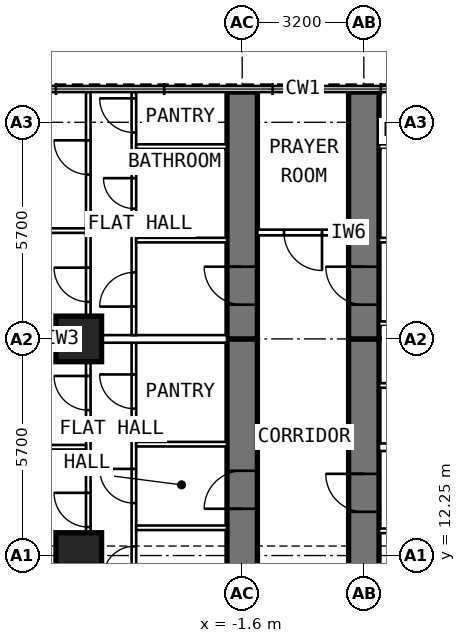
"""IFC4 building model, lengths in metres.
Left out: names, types, materials, properties, quantities, classifications, styles, units other than length and angle.
Written with IfcOpenShell. Run it as: python <this file> out.ifc"""

import sys

from ifc_helpers import new_model, si_unit, direction, frame, frame_2d, origin, origin_2d, place, context, subcontext, project, spatial, rectangle, extrude, element, fill, save


model = new_model("IFC4")
c1 = context("Model", 3, precision=1e-05, world=origin(), true_north=direction((0.0, 1.0)))
c2 = subcontext(c1, "Body", "Model", "MODEL_VIEW")
j1 = project(units=[si_unit("LENGTHUNIT", "METRE"), si_unit("PLANEANGLEUNIT", "RADIAN")], contexts=[c1])
p1 = place(None, origin())
s1 = spatial("IfcSite", under=j1, at=p1, CompositionType="ELEMENT")
p2 = place(p1, origin())
s2 = spatial("IfcBuilding", under=s1, at=p2, CompositionType="ELEMENT")
p3 = place(p2, frame((0.0, 0.0, 141.8)))
s3 = spatial("IfcBuildingStorey", under=s2, at=p3, CompositionType="ELEMENT", Elevation=141.8)
for number, where, z_axis, x_axis in (
    (1, (-5.9, 12.25, 0.0), (0.0, 0.0, 1.0), (0.0, 1.0, 0.0)),
    (2, (-5.9, 17.95, 0.0), (0.0, 0.0, 1.0), (0.0, 1.0, 0.0)),
):
    element("IfcColumn", number, at=place(p3, frame(where, z_axis=z_axis, x_axis=x_axis)), inside=s3, PredefinedType="COLUMN", context=c2, shape_type="SweptSolid", body=[
        extrude(rectangle(XDim=1.2, YDim=1.2, at=origin_2d()), origin(), (0.0, 0.0, 1.0), 3.6),
    ])
p4 = place(p3, frame((-1.6, 9.6, 0.0), z_axis=(0.0, 0.0, 1.0), x_axis=(0.0, 1.0, 0.0)))
e3 = element("IfcWall", 3, at=p4, inside=s3, PredefinedType="SHEAR", context=c2, shape_type="SweptSolid", body=[
    extrude(rectangle(XDim=8.35, YDim=0.8, at=frame_2d((4.175, 0.0))), origin(), (0.0, 0.0, 1.0), 3.6),
])
p5 = place(p4, frame((3.88, 0.0, 0.0)))
e4 = element("IfcOpeningElement", 4, at=p5, cuts=e3, PredefinedType="OPENING", context=c2, shape_type="SweptSolid", body=[
    extrude(rectangle(XDim=1.0, YDim=2.1, at=frame_2d((0.5, 1.05))), frame((0.0, 0.412, 0.0), z_axis=(0.0, -1.0, 0.0), x_axis=(1.0, 0.0, 0.0)), (0.0, 0.0, 1.0), 0.824),
])
p6 = place(p3, frame((-1.6, 17.95, 0.0), z_axis=(0.0, 0.0, 1.0), x_axis=(0.0, 1.0, 0.0)))
e5 = element("IfcWall", 5, at=p6, inside=s3, PredefinedType="SHEAR", context=c2, shape_type="SweptSolid", body=[
    extrude(rectangle(XDim=6.495, YDim=0.8, at=frame_2d((3.248, 0.0))), origin(), (0.0, 0.0, 1.0), 3.6),
])
p7 = place(p6, frame((0.9, 0.0, 0.0)))
e6 = element("IfcOpeningElement", 6, at=p7, cuts=e5, PredefinedType="OPENING", context=c2, shape_type="SweptSolid", body=[
    extrude(rectangle(XDim=1.0, YDim=2.1, at=frame_2d((0.5, 1.05))), frame((0.0, 0.412, 0.0), z_axis=(0.0, -1.0, 0.0), x_axis=(1.0, 0.0, 0.0)), (0.0, 0.0, 1.0), 0.824),
])
p8 = place(p3, frame((1.6, 9.6, 0.0), z_axis=(0.0, 0.0, 1.0), x_axis=(0.0, 1.0, 0.0)))
e7 = element("IfcWall", 7, at=p8, inside=s3, PredefinedType="SHEAR", context=c2, shape_type="SweptSolid", body=[
    extrude(rectangle(XDim=8.35, YDim=0.8, at=frame_2d((4.175, 0.0))), origin(), (0.0, 0.0, 1.0), 3.6),
])
p9 = place(p8, frame((3.8, 0.0, 0.0)))
e8 = element("IfcOpeningElement", 8, at=p9, cuts=e7, PredefinedType="OPENING", context=c2, shape_type="SweptSolid", body=[
    extrude(rectangle(XDim=1.0, YDim=2.1, at=frame_2d((0.5, 1.05))), frame((0.0, 0.412, 0.0), z_axis=(0.0, -1.0, 0.0), x_axis=(1.0, 0.0, 0.0)), (0.0, 0.0, 1.0), 0.824),
])
p10 = place(p3, frame((1.6, 17.95, 0.0), z_axis=(0.0, 0.0, 1.0), x_axis=(0.0, 1.0, 0.0)))
e9 = element("IfcWall", 9, at=p10, inside=s3, PredefinedType="SHEAR", context=c2, shape_type="SweptSolid", body=[
    extrude(rectangle(XDim=6.495, YDim=0.8, at=frame_2d((3.248, 0.0))), origin(), (0.0, 0.0, 1.0), 3.6),
])
p11 = place(p10, frame((0.9, 0.0, 0.0)))
e10 = element("IfcOpeningElement", 10, at=p11, cuts=e9, PredefinedType="OPENING", context=c2, shape_type="SweptSolid", body=[
    extrude(rectangle(XDim=1.0, YDim=2.1, at=frame_2d((0.5, 1.05))), frame((0.0, 0.412, 0.0), z_axis=(0.0, -1.0, 0.0), x_axis=(1.0, 0.0, 0.0)), (0.0, 0.0, 1.0), 0.824),
])
p12 = place(p3, frame((-4.45, 10.05, 0.0), z_axis=(0.0, 0.0, 1.0), x_axis=(0.0, 1.0, 0.0)))
e11 = element("IfcWall", 11, at=p12, inside=s3, PredefinedType="PARTITIONING", context=c2, shape_type="SweptSolid", body=[
    extrude(rectangle(XDim=7.8, YDim=0.12, at=frame_2d((3.9, 0.0))), origin(), (0.0, 0.0, 1.0), 3.35),
])
p13 = place(p12, frame((1.64, 0.0, 0.0)))
e12 = element("IfcOpeningElement", 12, at=p13, cuts=e11, PredefinedType="OPENING", context=c2, shape_type="SweptSolid", body=[
    extrude(rectangle(XDim=0.8, YDim=2.1, at=frame_2d((0.4, 1.05))), frame((0.0, 0.072, 0.0), z_axis=(0.0, -1.0, 0.0), x_axis=(1.0, 0.0, 0.0)), (0.0, 0.0, 1.0), 0.144),
])
p14 = place(p12, frame((3.58, 0.0, 0.0)))
e13 = element("IfcOpeningElement", 13, at=p14, cuts=e11, PredefinedType="OPENING", context=c2, shape_type="SweptSolid", body=[
    extrude(rectangle(XDim=0.9, YDim=2.1, at=frame_2d((0.45, 1.05))), frame((0.0, 0.072, 0.0), z_axis=(0.0, -1.0, 0.0), x_axis=(1.0, 0.0, 0.0)), (0.0, 0.0, 1.0), 0.144),
])
p15 = place(p12, frame((6.065, 0.0, 0.0)))
e14 = element("IfcOpeningElement", 14, at=p15, cuts=e11, PredefinedType="OPENING", context=c2, shape_type="SweptSolid", body=[
    extrude(rectangle(XDim=0.9, YDim=2.1, at=frame_2d((0.45, 1.05))), frame((0.0, 0.072, 0.0), z_axis=(0.0, -1.0, 0.0), x_axis=(1.0, 0.0, 0.0)), (0.0, 0.0, 1.0), 0.144),
])
p16 = place(p3, frame((-5.65, 9.6, 0.0), z_axis=(0.0, 0.0, 1.0), x_axis=(0.0, 1.0, 0.0)))
e15 = element("IfcWall", 15, at=p16, inside=s3, PredefinedType="PARTITIONING", context=c2, shape_type="SweptSolid", body=[
    extrude(rectangle(XDim=8.1, YDim=0.12, at=frame_2d((4.05, 0.0))), origin(), (0.0, 0.0, 1.0), 3.35),
])
p17 = place(p16, frame((3.4, 0.0, 0.0)))
e16 = element("IfcOpeningElement", 16, at=p17, cuts=e15, PredefinedType="OPENING", context=c2, shape_type="SweptSolid", body=[
    extrude(rectangle(XDim=0.9, YDim=2.1, at=frame_2d((0.45, 1.05))), frame((0.0, 0.072, 0.0), z_axis=(0.0, -1.0, 0.0), x_axis=(1.0, 0.0, 0.0)), (0.0, 0.0, 1.0), 0.144),
])
p18 = place(p16, frame((6.475, 0.0, 0.0)))
e17 = element("IfcOpeningElement", 17, at=p18, cuts=e15, PredefinedType="OPENING", context=c2, shape_type="SweptSolid", body=[
    extrude(rectangle(XDim=0.9, YDim=2.1, at=frame_2d((0.45, 1.05))), frame((0.0, 0.072, 0.0), z_axis=(0.0, -1.0, 0.0), x_axis=(1.0, 0.0, 0.0)), (0.0, 0.0, 1.0), 0.144),
])
p19 = place(p3, frame((-5.71, 15.1, 0.0), z_axis=(0.0, 0.0, 1.0), x_axis=(-1.0, 0.0, 0.0)))
e18 = element("IfcWall", 18, at=p19, inside=s3, PredefinedType="PARTITIONING", context=c2, shape_type="SweptSolid", body=[
    extrude(rectangle(XDim=4.99, YDim=0.12, at=frame_2d((2.495, 0.0))), origin(), (0.0, 0.0, 1.0), 3.35),
])
for number, where, z_axis, x_axis in (
    (19, (-2.0, 12.98, 0.0), (0.0, 0.0, 1.0), (-1.0, 0.0, 0.0)),
    (20, (-2.0, 15.18, 0.0), (0.0, 0.0, 1.0), (-1.0, 0.0, 0.0)),
):
    element("IfcWall", number, at=place(p3, frame(where, z_axis=z_axis, x_axis=x_axis)), inside=s3, PredefinedType="PARTITIONING", context=c2, shape_type="SweptSolid", body=[
        extrude(rectangle(XDim=2.39, YDim=0.12, at=frame_2d((1.195, 0.0))), origin(), (0.0, 0.0, 1.0), 3.35),
    ])
p20 = place(p3, frame((-4.45, 18.05, 0.0), z_axis=(0.0, 0.0, 1.0), x_axis=(0.0, 1.0, 0.0)))
e21 = element("IfcWall", 21, at=p20, inside=s3, PredefinedType="PARTITIONING", context=c2, shape_type="SweptSolid", body=[
    extrude(rectangle(XDim=6.395, YDim=0.12, at=frame_2d((3.198, 0.0))), origin(), (0.0, 0.0, 1.0), 3.35),
])
p21 = place(p20, frame((0.75, 0.0, 0.0)))
e22 = element("IfcOpeningElement", 22, at=p21, cuts=e21, PredefinedType="OPENING", context=c2, shape_type="SweptSolid", body=[
    extrude(rectangle(XDim=0.9, YDim=2.1, at=frame_2d((0.45, 1.05))), frame((0.0, 0.072, 0.0), z_axis=(0.0, -1.0, 0.0), x_axis=(1.0, 0.0, 0.0)), (0.0, 0.0, 1.0), 0.144),
])
p22 = place(p20, frame((3.33, 0.0, 0.0)))
e23 = element("IfcOpeningElement", 23, at=p22, cuts=e21, PredefinedType="OPENING", context=c2, shape_type="SweptSolid", body=[
    extrude(rectangle(XDim=0.8, YDim=2.1, at=frame_2d((0.4, 1.05))), frame((0.0, 0.072, 0.0), z_axis=(0.0, -1.0, 0.0), x_axis=(1.0, 0.0, 0.0)), (0.0, 0.0, 1.0), 0.144),
])
p23 = place(p20, frame((5.33, 0.0, 0.0)))
e24 = element("IfcOpeningElement", 24, at=p23, cuts=e21, PredefinedType="OPENING", context=c2, shape_type="SweptSolid", body=[
    extrude(rectangle(XDim=0.9, YDim=2.1, at=frame_2d((0.45, 1.05))), frame((0.0, 0.072, 0.0), z_axis=(0.0, -1.0, 0.0), x_axis=(1.0, 0.0, 0.0)), (0.0, 0.0, 1.0), 0.144),
])
p24 = place(p3, frame((-5.65, 18.05, 0.0), z_axis=(0.0, 0.0, 1.0), x_axis=(0.0, 1.0, 0.0)))
e25 = element("IfcWall", 25, at=p24, inside=s3, PredefinedType="PARTITIONING", context=c2, shape_type="SweptSolid", body=[
    extrude(rectangle(XDim=6.395, YDim=0.12, at=frame_2d((3.198, 0.0))), origin(), (0.0, 0.0, 1.0), 3.35),
])
p25 = place(p24, frame((0.875, 0.0, 0.0)))
e26 = element("IfcOpeningElement", 26, at=p25, cuts=e25, PredefinedType="OPENING", context=c2, shape_type="SweptSolid", body=[
    extrude(rectangle(XDim=0.9, YDim=2.1, at=frame_2d((0.45, 1.05))), frame((0.0, 0.072, 0.0), z_axis=(0.0, -1.0, 0.0), x_axis=(1.0, 0.0, 0.0)), (0.0, 0.0, 1.0), 0.144),
])
p26 = place(p24, frame((4.225, 0.0, 0.0)))
e27 = element("IfcOpeningElement", 27, at=p26, cuts=e25, PredefinedType="OPENING", context=c2, shape_type="SweptSolid", body=[
    extrude(rectangle(XDim=0.9, YDim=2.1, at=frame_2d((0.45, 1.05))), frame((0.0, 0.072, 0.0), z_axis=(0.0, -1.0, 0.0), x_axis=(1.0, 0.0, 0.0)), (0.0, 0.0, 1.0), 0.144),
])
p27 = place(p3, frame((-5.71, 20.8, 0.0), z_axis=(0.0, 0.0, 1.0), x_axis=(-1.0, 0.0, 0.0)))
e28 = element("IfcWall", 28, at=p27, inside=s3, PredefinedType="PARTITIONING", context=c2, shape_type="SweptSolid", body=[
    extrude(rectangle(XDim=4.99, YDim=0.12, at=frame_2d((2.495, 0.0))), origin(), (0.0, 0.0, 1.0), 3.35),
])
for number, where, z_axis, x_axis in (
    (29, (-2.0, 20.55, 0.0), (0.0, 0.0, 1.0), (-1.0, 0.0, 0.0)),
    (30, (-2.0, 23.01, 0.0), (0.0, 0.0, 1.0), (-1.0, 0.0, 0.0)),
):
    element("IfcWall", number, at=place(p3, frame(where, z_axis=z_axis, x_axis=x_axis)), inside=s3, PredefinedType="PARTITIONING", context=c2, shape_type="SweptSolid", body=[
        extrude(rectangle(XDim=2.39, YDim=0.12, at=frame_2d((1.195, 0.0))), origin(), (0.0, 0.0, 1.0), 3.35),
    ])
p28 = place(p3, frame((-2.0, 17.95, 0.0), z_axis=(0.0, 0.0, 1.0), x_axis=(-1.0, 0.0, 0.0)))
e31 = element("IfcWall", 31, at=p28, inside=s3, PredefinedType="PARTITIONING", context=c2, shape_type="SweptSolid", body=[
    extrude(rectangle(XDim=8.7, YDim=0.2, at=frame_2d((4.35, 0.0))), origin(), (0.0, 0.0, 1.0), 2.45),
])
for number, where, z_axis, x_axis in (
    (32, (2.0, 12.9, 0.0), (0.0, 0.0, 1.0), (1.0, 0.0, 0.0)),
    (33, (2.0, 16.725, 0.0), (0.0, 0.0, 1.0), (1.0, 0.0, 0.0)),
    (34, (2.0, 18.35, 0.0), (0.0, 0.0, 1.0), (1.0, 0.0, 0.0)),
    (35, (2.0, 20.55, 0.0), (0.0, 0.0, 1.0), (1.0, 0.0, 0.0)),
    (36, (2.0, 23.01, 0.0), (0.0, 0.0, 1.0), (1.0, 0.0, 0.0)),
):
    element("IfcWall", number, at=place(p3, frame(where, z_axis=z_axis, x_axis=x_axis)), inside=s3, PredefinedType="PARTITIONING", context=c2, shape_type="SweptSolid", body=[
        extrude(rectangle(XDim=2.39, YDim=0.12, at=frame_2d((1.195, 0.0))), origin(), (0.0, 0.0, 1.0), 3.35),
    ])
p29 = place(p3, frame((2.0, 15.1, 0.0), z_axis=(0.0, 0.0, 1.0), x_axis=(1.0, 0.0, 0.0)))
e37 = element("IfcWall", 37, at=p29, inside=s3, PredefinedType="PARTITIONING", context=c2, shape_type="SweptSolid", body=[
    extrude(rectangle(XDim=8.7, YDim=0.2, at=frame_2d((4.35, 0.0))), origin(), (0.0, 0.0, 1.0), 3.35),
])
p30 = place(p3, frame((1.2, 20.75, 0.0), z_axis=(0.0, 0.0, 1.0), x_axis=(-1.0, 0.0, 0.0)))
e38 = element("IfcWall", 38, at=p30, inside=s3, PredefinedType="PARTITIONING", context=c2, shape_type="SweptSolid", body=[
    extrude(rectangle(XDim=2.4, YDim=0.15, at=frame_2d((1.2, 0.0))), origin(), (0.0, 0.0, 1.0), 3.35),
])
p31 = place(p30, frame((0.7, 0.0, 0.0)))
e39 = element("IfcOpeningElement", 39, at=p31, cuts=e38, PredefinedType="OPENING", context=c2, shape_type="SweptSolid", body=[
    extrude(rectangle(XDim=1.0, YDim=2.1, at=frame_2d((0.5, 1.05))), frame((0.0, 0.087, 0.0), z_axis=(0.0, -1.0, 0.0), x_axis=(1.0, 0.0, 0.0)), (0.0, 0.0, 1.0), 0.174),
])
p32 = place(p5, origin())
e40 = element("IfcDoor", 40, at=p32, inside=s3, OperationType="SINGLE_SWING_LEFT", PredefinedType="DOOR", context=c2, shape_type="SweptSolid", body=[
    extrude(rectangle(XDim=1.0, YDim=2.1, at=frame_2d((0.5, 1.05))), frame((0.0, 0.15, 0.0), z_axis=(0.0, -1.0, 0.0), x_axis=(1.0, 0.0, 0.0)), (0.0, 0.0, 1.0), 0.3),
])
fill(e4, e40)
p33 = place(p17, origin())
e41 = element("IfcDoor", 41, at=p33, inside=s3, OperationType="SINGLE_SWING_RIGHT", PredefinedType="DOOR", context=c2, shape_type="SweptSolid", body=[
    extrude(rectangle(XDim=0.9, YDim=2.1, at=frame_2d((0.45, 1.05))), frame((0.0, 0.025, 0.0), z_axis=(0.0, -1.0, 0.0), x_axis=(1.0, 0.0, 0.0)), (0.0, 0.0, 1.0), 0.05),
])
fill(e16, e41)
p34 = place(p18, origin())
e42 = element("IfcDoor", 42, at=p34, inside=s3, OperationType="SINGLE_SWING_RIGHT", PredefinedType="DOOR", context=c2, shape_type="SweptSolid", body=[
    extrude(rectangle(XDim=0.9, YDim=2.1, at=frame_2d((0.45, 1.05))), frame((0.0, 0.025, 0.0), z_axis=(0.0, -1.0, 0.0), x_axis=(1.0, 0.0, 0.0)), (0.0, 0.0, 1.0), 0.05),
])
fill(e17, e42)
p35 = place(p13, origin())
e43 = element("IfcDoor", 43, at=p35, inside=s3, OperationType="SINGLE_SWING_LEFT", PredefinedType="DOOR", context=c2, shape_type="SweptSolid", body=[
    extrude(rectangle(XDim=0.8, YDim=2.1, at=frame_2d((0.4, 1.05))), frame((0.0, 0.025, 0.0), z_axis=(0.0, -1.0, 0.0), x_axis=(1.0, 0.0, 0.0)), (0.0, 0.0, 1.0), 0.05),
])
fill(e12, e43)
p36 = place(p14, origin())
e44 = element("IfcDoor", 44, at=p36, inside=s3, OperationType="SINGLE_SWING_RIGHT", PredefinedType="DOOR", context=c2, shape_type="SweptSolid", body=[
    extrude(rectangle(XDim=0.9, YDim=2.1, at=frame_2d((0.45, 1.05))), frame((0.0, 0.025, 0.0), z_axis=(0.0, -1.0, 0.0), x_axis=(1.0, 0.0, 0.0)), (0.0, 0.0, 1.0), 0.05),
])
fill(e13, e44)
p37 = place(p15, origin())
e45 = element("IfcDoor", 45, at=p37, inside=s3, OperationType="SINGLE_SWING_RIGHT", PredefinedType="DOOR", context=c2, shape_type="SweptSolid", body=[
    extrude(rectangle(XDim=0.9, YDim=2.1, at=frame_2d((0.45, 1.05))), frame((0.0, 0.025, 0.0), z_axis=(0.0, -1.0, 0.0), x_axis=(1.0, 0.0, 0.0)), (0.0, 0.0, 1.0), 0.05),
])
fill(e14, e45)
p38 = place(p7, origin())
e46 = element("IfcDoor", 46, at=p38, inside=s3, OperationType="SINGLE_SWING_RIGHT", PredefinedType="DOOR", context=c2, shape_type="SweptSolid", body=[
    extrude(rectangle(XDim=1.0, YDim=2.1, at=frame_2d((0.5, 1.05))), frame((0.0, 0.15, 0.0), z_axis=(0.0, -1.0, 0.0), x_axis=(1.0, 0.0, 0.0)), (0.0, 0.0, 1.0), 0.3),
])
fill(e6, e46)
p39 = place(p25, origin())
e47 = element("IfcDoor", 47, at=p39, inside=s3, OperationType="SINGLE_SWING_RIGHT", PredefinedType="DOOR", context=c2, shape_type="SweptSolid", body=[
    extrude(rectangle(XDim=0.9, YDim=2.1, at=frame_2d((0.45, 1.05))), frame((0.0, 0.025, 0.0), z_axis=(0.0, -1.0, 0.0), x_axis=(1.0, 0.0, 0.0)), (0.0, 0.0, 1.0), 0.05),
])
fill(e26, e47)
p40 = place(p26, origin())
e48 = element("IfcDoor", 48, at=p40, inside=s3, OperationType="SINGLE_SWING_RIGHT", PredefinedType="DOOR", context=c2, shape_type="SweptSolid", body=[
    extrude(rectangle(XDim=0.9, YDim=2.1, at=frame_2d((0.45, 1.05))), frame((0.0, 0.025, 0.0), z_axis=(0.0, -1.0, 0.0), x_axis=(1.0, 0.0, 0.0)), (0.0, 0.0, 1.0), 0.05),
])
fill(e27, e48)
p41 = place(p21, origin())
e49 = element("IfcDoor", 49, at=p41, inside=s3, OperationType="SINGLE_SWING_LEFT", PredefinedType="DOOR", context=c2, shape_type="SweptSolid", body=[
    extrude(rectangle(XDim=0.9, YDim=2.1, at=frame_2d((0.45, 1.05))), frame((0.0, 0.025, 0.0), z_axis=(0.0, -1.0, 0.0), x_axis=(1.0, 0.0, 0.0)), (0.0, 0.0, 1.0), 0.05),
])
fill(e22, e49)
p42 = place(p22, origin())
e50 = element("IfcDoor", 50, at=p42, inside=s3, OperationType="SINGLE_SWING_RIGHT", PredefinedType="DOOR", context=c2, shape_type="SweptSolid", body=[
    extrude(rectangle(XDim=0.8, YDim=2.1, at=frame_2d((0.4, 1.05))), frame((0.0, 0.025, 0.0), z_axis=(0.0, -1.0, 0.0), x_axis=(1.0, 0.0, 0.0)), (0.0, 0.0, 1.0), 0.05),
])
fill(e23, e50)
p43 = place(p23, origin())
e51 = element("IfcDoor", 51, at=p43, inside=s3, OperationType="SINGLE_SWING_RIGHT", PredefinedType="DOOR", context=c2, shape_type="SweptSolid", body=[
    extrude(rectangle(XDim=0.9, YDim=2.1, at=frame_2d((0.45, 1.05))), frame((0.0, 0.025, 0.0), z_axis=(0.0, -1.0, 0.0), x_axis=(1.0, 0.0, 0.0)), (0.0, 0.0, 1.0), 0.05),
])
fill(e24, e51)
p44 = place(p9, origin())
e52 = element("IfcDoor", 52, at=p44, inside=s3, OperationType="SINGLE_SWING_RIGHT", PredefinedType="DOOR", context=c2, shape_type="SweptSolid", body=[
    extrude(rectangle(XDim=1.0, YDim=2.1, at=frame_2d((0.5, 1.05))), frame((0.0, 0.15, 0.0), z_axis=(0.0, -1.0, 0.0), x_axis=(1.0, 0.0, 0.0)), (0.0, 0.0, 1.0), 0.3),
])
fill(e8, e52)
p45 = place(p11, origin())
e53 = element("IfcDoor", 53, at=p45, inside=s3, OperationType="SINGLE_SWING_RIGHT", PredefinedType="DOOR", context=c2, shape_type="SweptSolid", body=[
    extrude(rectangle(XDim=1.0, YDim=2.1, at=frame_2d((0.5, 1.05))), frame((0.0, 0.15, 0.0), z_axis=(0.0, -1.0, 0.0), x_axis=(1.0, 0.0, 0.0)), (0.0, 0.0, 1.0), 0.3),
])
fill(e10, e53)
p46 = place(p31, origin())
e54 = element("IfcDoor", 54, at=p46, inside=s3, OperationType="SINGLE_SWING_LEFT", PredefinedType="DOOR", context=c2, shape_type="SweptSolid", body=[
    extrude(rectangle(XDim=1.0, YDim=2.1, at=frame_2d((0.5, 1.05))), frame((0.0, 0.025, 0.0), z_axis=(0.0, -1.0, 0.0), x_axis=(1.0, 0.0, 0.0)), (0.0, 0.0, 1.0), 0.05),
])
fill(e39, e54)
save(model, sys.argv[1])
